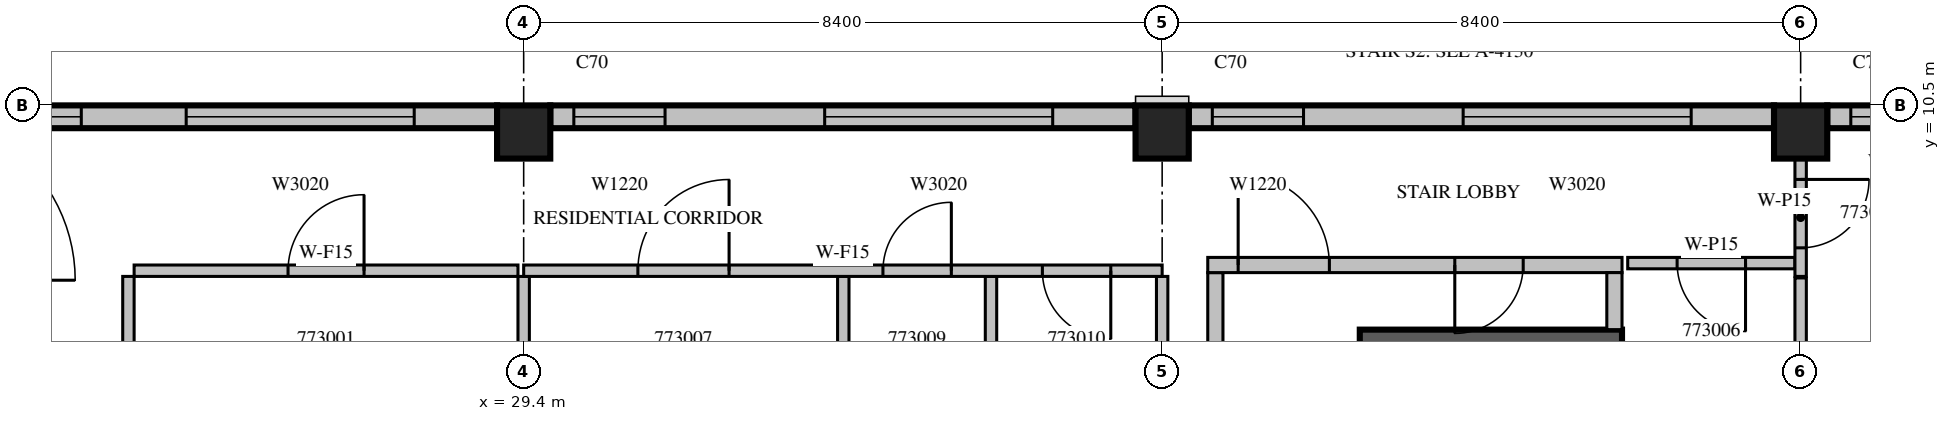
"""IFC4 building model, lengths in metres.
Left out: names, types, materials, properties, quantities, classifications, styles, units other than length and angle.
Written with IfcOpenShell. Run it as: python <this file> out.ifc"""

import sys

from ifc_helpers import new_model, si_unit, direction, frame, frame_2d, origin, origin_2d, place, context, subcontext, project, spatial, rectangle, extrude, source, transform, mapped, element, fill, save


model = new_model("IFC4")
c1 = context("Model", 3, precision=1e-05, world=origin(), true_north=direction((0.0, 1.0)))
c2 = subcontext(c1, "Body", "Model", "MODEL_VIEW")
j1 = project(units=[si_unit("LENGTHUNIT", "METRE"), si_unit("PLANEANGLEUNIT", "RADIAN")], contexts=[c1])
p1 = place(None, origin())
s1 = spatial("IfcSite", under=j1, at=p1, CompositionType="ELEMENT")
p2 = place(p1, origin())
s2 = spatial("IfcBuilding", under=s1, at=p2, CompositionType="ELEMENT")
p3 = place(p2, frame((0.0, 0.0, 316.0)))
s3 = spatial("IfcBuildingStorey", under=s2, at=p3, CompositionType="ELEMENT", Elevation=316.0)
m1 = source(origin(), c2, "Body", "SweptSolid", [
    extrude(rectangle(XDim=0.7, YDim=0.7, at=origin_2d()), origin(), (0.0, 0.0, 1.0), 3.5),
])
for number, where, z_axis, x_axis in (
    (1, (29.4, 10.15, 0.0), (0.0, 0.0, 1.0), (1.0, 0.0, 0.0)),
    (2, (37.8, 10.15, 0.0), (0.0, 0.0, 1.0), (1.0, 0.0, 0.0)),
    (3, (46.2, 10.15, 0.0), (0.0, 0.0, 1.0), (1.0, 0.0, 0.0)),
):
    element("IfcColumn", number, at=place(p3, frame(where, z_axis=z_axis, x_axis=x_axis)), inside=s3, PredefinedType="COLUMN", context=c2, shape_type="MappedRepresentation", body=[
        mapped(m1, transform((0.0, 0.0, 0.0), scale=1.0)),
    ])
m2 = source(origin(), c2, "Body", "SweptSolid", [
    extrude(rectangle(XDim=3.01, YDim=0.3, at=frame_2d((1.505, 0.0))), origin(), (0.0, 0.0, 1.0), 3.1),
])
p4 = place(p3, frame((49.56, 10.35, 0.0), z_axis=(0.0, 0.0, 1.0), x_axis=(-1.0, 0.0, 0.0)))
e4 = element("IfcWall", 4, at=p4, inside=s3, PredefinedType="STANDARD", context=c2, shape_type="MappedRepresentation", body=[
    mapped(m2, transform((0.0, 0.0, 0.0), scale=1.0)),
])
m3 = source(origin(), c2, "Body", "SweptSolid", [
    extrude(rectangle(XDim=1.2, YDim=2.0, at=frame_2d((0.6, 1.0))), frame((0.0, 0.16, 0.0), z_axis=(0.0, -1.0, 0.0), x_axis=(1.0, 0.0, 0.0)), (0.0, 0.0, 1.0), 0.32),
])
p5 = place(p4, frame((1.5, 0.0, 0.6)))
e5 = element("IfcOpeningElement", 5, at=p5, cuts=e4, PredefinedType="OPENING", context=c2, shape_type="MappedRepresentation", body=[
    mapped(m3, transform((0.0, 0.0, 0.0), scale=1.0)),
])
m4 = source(origin(), c2, "Body", "SweptSolid", [
    extrude(rectangle(XDim=7.7, YDim=0.3, at=frame_2d((3.85, 0.0))), origin(), (0.0, 0.0, 1.0), 3.1),
])
p6 = place(p3, frame((45.85, 10.35, 0.0), z_axis=(0.0, 0.0, 1.0), x_axis=(-1.0, 0.0, 0.0)))
e6 = element("IfcWall", 6, at=p6, inside=s3, PredefinedType="STANDARD", context=c2, shape_type="MappedRepresentation", body=[
    mapped(m4, transform((0.0, 0.0, 0.0), scale=1.0)),
])
m5 = source(origin(), c2, "Body", "SweptSolid", [
    extrude(rectangle(XDim=3.0, YDim=2.0, at=frame_2d((1.5, 1.0))), frame((0.0, 0.16, 0.0), z_axis=(0.0, -1.0, 0.0), x_axis=(1.0, 0.0, 0.0)), (0.0, 0.0, 1.0), 0.32),
])
p7 = place(p6, frame((1.09, 0.0, 0.6)))
e7 = element("IfcOpeningElement", 7, at=p7, cuts=e6, PredefinedType="OPENING", context=c2, shape_type="MappedRepresentation", body=[
    mapped(m5, transform((0.0, 0.0, 0.0), scale=1.0)),
])
p8 = place(p6, frame((6.19, 0.0, 0.6)))
e8 = element("IfcOpeningElement", 8, at=p8, cuts=e6, PredefinedType="OPENING", context=c2, shape_type="MappedRepresentation", body=[
    mapped(m3, transform((0.0, 0.0, 0.0), scale=1.0)),
])
p9 = place(p3, frame((37.45, 10.35, 0.0), z_axis=(0.0, 0.0, 1.0), x_axis=(-1.0, 0.0, 0.0)))
e9 = element("IfcWall", 9, at=p9, inside=s3, PredefinedType="STANDARD", context=c2, shape_type="MappedRepresentation", body=[
    mapped(m4, transform((0.0, 0.0, 0.0), scale=1.0)),
])
p10 = place(p9, frame((1.09, 0.0, 0.6)))
e10 = element("IfcOpeningElement", 10, at=p10, cuts=e9, PredefinedType="OPENING", context=c2, shape_type="MappedRepresentation", body=[
    mapped(m5, transform((0.0, 0.0, 0.0), scale=1.0)),
])
p11 = place(p9, frame((6.19, 0.0, 0.6)))
e11 = element("IfcOpeningElement", 11, at=p11, cuts=e9, PredefinedType="OPENING", context=c2, shape_type="MappedRepresentation", body=[
    mapped(m3, transform((0.0, 0.0, 0.0), scale=1.0)),
])
m6 = source(origin(), c2, "Body", "SweptSolid", [
    extrude(rectangle(XDim=7.45, YDim=0.3, at=frame_2d((3.725, 0.0))), origin(), (0.0, 0.0, 1.0), 3.1),
])
p12 = place(p3, frame((29.05, 10.35, 0.0), z_axis=(0.0, 0.0, 1.0), x_axis=(-1.0, 0.0, 0.0)))
e12 = element("IfcWall", 12, at=p12, inside=s3, PredefinedType="STANDARD", context=c2, shape_type="MappedRepresentation", body=[
    mapped(m6, transform((0.0, 0.0, 0.0), scale=1.0)),
])
p13 = place(p12, frame((1.09, 0.0, 0.6)))
e13 = element("IfcOpeningElement", 13, at=p13, cuts=e12, PredefinedType="OPENING", context=c2, shape_type="MappedRepresentation", body=[
    mapped(m5, transform((0.0, 0.0, 0.0), scale=1.0)),
])
m7 = source(origin(), c2, "Body", "SweptSolid", [
    extrude(rectangle(XDim=1.8, YDim=2.0, at=frame_2d((0.9, 1.0))), frame((0.0, 0.16, 0.0), z_axis=(0.0, -1.0, 0.0), x_axis=(1.0, 0.0, 0.0)), (0.0, 0.0, 1.0), 0.32),
])
p14 = place(p12, frame((5.47, 0.0, 0.6)))
e14 = element("IfcOpeningElement", 14, at=p14, cuts=e12, PredefinedType="OPENING", context=c2, shape_type="MappedRepresentation", body=[
    mapped(m7, transform((0.0, 0.0, 0.0), scale=1.0)),
])
m8 = source(origin(), c2, "Body", "SweptSolid", [
    extrude(rectangle(XDim=3.45, YDim=0.25, at=frame_2d((1.725, 0.0))), origin(), (0.0, 0.0, 1.0), 3.1),
])
p15 = place(p3, frame((40.4, 7.425, 0.0), z_axis=(0.0, 0.0, 1.0), x_axis=(1.0, 0.0, 0.0)))
e15 = element("IfcWall", 15, at=p15, inside=s3, PredefinedType="SOLIDWALL", context=c2, shape_type="MappedRepresentation", body=[
    mapped(m8, transform((0.0, 0.0, 0.0), scale=1.0)),
])
m9 = source(origin(), c2, "Body", "SweptSolid", [
    extrude(rectangle(XDim=8.0, YDim=0.2, at=frame_2d((4.0, 0.0))), origin(), (0.0, 0.0, 1.0), 3.1),
])
p16 = place(p3, frame((38.5, 0.3, 0.0), z_axis=(0.0, 0.0, 1.0), x_axis=(0.0, 1.0, 0.0)))
e16 = element("IfcWall", 16, at=p16, inside=s3, PredefinedType="PARTITIONING", context=c2, shape_type="MappedRepresentation", body=[
    mapped(m9, transform((0.0, 0.0, 0.0), scale=1.0)),
])
m10 = source(origin(), c2, "Body", "SweptSolid", [
    extrude(rectangle(XDim=5.45, YDim=0.2, at=frame_2d((2.725, 0.0))), origin(), (0.0, 0.0, 1.0), 3.1),
])
p17 = place(p3, frame((38.4, 8.4, 0.0), z_axis=(0.0, 0.0, 1.0), x_axis=(1.0, 0.0, 0.0)))
e17 = element("IfcWall", 17, at=p17, inside=s3, PredefinedType="PARTITIONING", context=c2, shape_type="MappedRepresentation", body=[
    mapped(m10, transform((0.0, 0.0, 0.0), scale=1.0)),
])
m11 = source(origin(), c2, "Body", "SweptSolid", [
    extrude(rectangle(XDim=1.2, YDim=2.1, at=frame_2d((0.6, 1.05))), frame((0.0, 0.11, 0.0), z_axis=(0.0, -1.0, 0.0), x_axis=(1.0, 0.0, 0.0)), (0.0, 0.0, 1.0), 0.22),
])
p18 = place(p17, frame((0.4, 0.0, 0.0)))
e18 = element("IfcOpeningElement", 18, at=p18, cuts=e17, PredefinedType="OPENING", context=c2, shape_type="MappedRepresentation", body=[
    mapped(m11, transform((0.0, 0.0, 0.0), scale=1.0)),
])
m12 = source(origin(), c2, "Body", "SweptSolid", [
    extrude(rectangle(XDim=0.9, YDim=2.1, at=frame_2d((0.45, 1.05))), frame((0.0, 0.11, 0.0), z_axis=(0.0, -1.0, 0.0), x_axis=(1.0, 0.0, 0.0)), (0.0, 0.0, 1.0), 0.22),
])
p19 = place(p17, frame((3.25, 0.0, 0.0)))
e19 = element("IfcOpeningElement", 19, at=p19, cuts=e17, PredefinedType="OPENING", context=c2, shape_type="MappedRepresentation", body=[
    mapped(m12, transform((0.0, 0.0, 0.0), scale=1.0)),
])
m13 = source(origin(), c2, "Body", "SweptSolid", [
    extrude(rectangle(XDim=0.75, YDim=0.2, at=frame_2d((0.375, 0.0))), origin(), (0.0, 0.0, 1.0), 3.1),
])
p20 = place(p3, frame((43.75, 7.55, 0.0), z_axis=(0.0, 0.0, 1.0), x_axis=(0.0, 1.0, 0.0)))
e20 = element("IfcWall", 20, at=p20, inside=s3, PredefinedType="PARTITIONING", context=c2, shape_type="MappedRepresentation", body=[
    mapped(m13, transform((0.0, 0.0, 0.0), scale=1.0)),
])
m14 = source(origin(), c2, "Body", "SweptSolid", [
    extrude(rectangle(XDim=4.575, YDim=0.15, at=frame_2d((2.288, 0.0))), origin(), (0.0, 0.0, 1.0), 3.1),
])
p21 = place(p3, frame((24.2, 8.25, 0.0), z_axis=(0.0, 0.0, 1.0), x_axis=(0.0, -1.0, 0.0)))
e21 = element("IfcWall", 21, at=p21, inside=s3, PredefinedType="PARTITIONING", context=c2, shape_type="MappedRepresentation", body=[
    mapped(m14, transform((0.0, 0.0, 0.0), scale=1.0)),
])
m15 = source(origin(), c2, "Body", "SweptSolid", [
    extrude(rectangle(XDim=0.9, YDim=2.1, at=frame_2d((0.45, 1.05))), frame((0.0, 0.085, 0.0), z_axis=(0.0, -1.0, 0.0), x_axis=(1.0, 0.0, 0.0)), (0.0, 0.0, 1.0), 0.17),
])
p22 = place(p21, frame((2.981, 0.0, 0.0)))
e22 = element("IfcOpeningElement", 22, at=p22, cuts=e21, PredefinedType="OPENING", context=c2, shape_type="MappedRepresentation", body=[
    mapped(m15, transform((0.0, 0.0, 0.0), scale=1.0)),
])
p23 = place(p3, frame((29.4, 3.675, 0.0), z_axis=(0.0, 0.0, 1.0), x_axis=(0.0, 1.0, 0.0)))
e23 = element("IfcWall", 23, at=p23, inside=s3, PredefinedType="PARTITIONING", context=c2, shape_type="MappedRepresentation", body=[
    mapped(m14, transform((0.0, 0.0, 0.0), scale=1.0)),
])
p24 = place(p3, frame((29.325, 8.325, 0.0), z_axis=(0.0, 0.0, 1.0), x_axis=(-1.0, 0.0, 0.0)))
e24 = element("IfcWall", 24, at=p24, inside=s3, PredefinedType="PARTITIONING", context=c2, shape_type="SweptSolid", body=[
    extrude(rectangle(XDim=5.05, YDim=0.15, at=frame_2d((2.525, 0.0))), origin(), (0.0, 0.0, 1.0), 3.1),
])
m16 = source(origin(), c2, "Body", "SweptSolid", [
    extrude(rectangle(XDim=1.0, YDim=2.1, at=frame_2d((0.5, 1.05))), frame((0.0, 0.085, 0.0), z_axis=(0.0, -1.0, 0.0), x_axis=(1.0, 0.0, 0.0)), (0.0, 0.0, 1.0), 0.17),
])
p25 = place(p24, frame((2.025, 0.0, 0.0)))
e25 = element("IfcOpeningElement", 25, at=p25, cuts=e24, PredefinedType="OPENING", context=c2, shape_type="MappedRepresentation", body=[
    mapped(m16, transform((0.0, 0.0, 0.0), scale=1.0)),
])
m17 = source(origin(), c2, "Body", "SweptSolid", [
    extrude(rectangle(XDim=2.2, YDim=0.15, at=frame_2d((1.1, 0.0))), origin(), (0.0, 0.0, 1.0), 3.1),
])
p26 = place(p3, frame((46.125, 8.425, 0.0), z_axis=(0.0, 0.0, 1.0), x_axis=(-1.0, 0.0, 0.0)))
e26 = element("IfcWall", 26, at=p26, inside=s3, PredefinedType="PARTITIONING", context=c2, shape_type="MappedRepresentation", body=[
    mapped(m17, transform((0.0, 0.0, 0.0), scale=1.0)),
])
p27 = place(p26, frame((0.65, 0.0, 0.0)))
e27 = element("IfcOpeningElement", 27, at=p27, cuts=e26, PredefinedType="OPENING", context=c2, shape_type="MappedRepresentation", body=[
    mapped(m15, transform((0.0, 0.0, 0.0), scale=1.0)),
])
p28 = place(p3, frame((33.605, 5.25, 0.0), z_axis=(0.0, 0.0, 1.0), x_axis=(0.0, 1.0, 0.0)))
e28 = element("IfcWall", 28, at=p28, inside=s3, PredefinedType="PARTITIONING", context=c2, shape_type="SweptSolid", body=[
    extrude(rectangle(XDim=3.0, YDim=0.15, at=frame_2d((1.5, 0.0))), origin(), (0.0, 0.0, 1.0), 3.1),
])
m18 = source(origin(), c2, "Body", "SweptSolid", [
    extrude(rectangle(XDim=3.0, YDim=0.15, at=frame_2d((1.5, 0.0))), origin(), (0.0, 0.0, 1.0), 3.1),
])
for number, where, z_axis, x_axis in (
    (29, (35.548, 5.25, 0.0), (0.0, 0.0, 1.0), (0.0, 1.0, 0.0)),
    (30, (37.8, 5.25, 0.0), (0.0, 0.0, 1.0), (0.0, 1.0, 0.0)),
):
    element("IfcWall", number, at=place(p3, frame(where, z_axis=z_axis, x_axis=x_axis)), inside=s3, PredefinedType="PARTITIONING", context=c2, shape_type="MappedRepresentation", body=[
        mapped(m18, transform((0.0, 0.0, 0.0), scale=1.0)),
    ])
m19 = source(origin(), c2, "Body", "SweptSolid", [
    extrude(rectangle(XDim=1.551, YDim=0.15, at=frame_2d((0.775, 0.0))), origin(), (0.0, 0.0, 1.0), 3.1),
])
p29 = place(p3, frame((46.2, 9.801, 0.0), z_axis=(0.0, 0.0, 1.0), x_axis=(0.0, -1.0, 0.0)))
e31 = element("IfcWall", 31, at=p29, inside=s3, PredefinedType="PARTITIONING", context=c2, shape_type="MappedRepresentation", body=[
    mapped(m19, transform((0.0, 0.0, 0.0), scale=1.0)),
])
p30 = place(p29, frame((0.275, 0.0, 0.0)))
e32 = element("IfcOpeningElement", 32, at=p30, cuts=e31, PredefinedType="OPENING", context=c2, shape_type="MappedRepresentation", body=[
    mapped(m15, transform((0.0, 0.0, 0.0), scale=1.0)),
])
p31 = place(p3, frame((46.2, 5.25, 0.0), z_axis=(0.0, 0.0, 1.0), x_axis=(0.0, 1.0, 0.0)))
e33 = element("IfcWall", 33, at=p31, inside=s3, PredefinedType="PARTITIONING", context=c2, shape_type="SweptSolid", body=[
    extrude(rectangle(XDim=2.98, YDim=0.15, at=frame_2d((1.49, 0.0))), origin(), (0.0, 0.0, 1.0), 3.1),
])
m20 = source(origin(), c2, "Body", "SweptSolid", [
    extrude(rectangle(XDim=8.4, YDim=0.15, at=frame_2d((4.2, 0.0))), origin(), (0.0, 0.0, 1.0), 3.1),
])
p32 = place(p3, frame((37.8, 8.325, 0.0), z_axis=(0.0, 0.0, 1.0), x_axis=(-1.0, 0.0, 0.0)))
e34 = element("IfcWall", 34, at=p32, inside=s3, PredefinedType="PARTITIONING", context=c2, shape_type="MappedRepresentation", body=[
    mapped(m20, transform((0.0, 0.0, 0.0), scale=1.0)),
])
m21 = source(origin(), c2, "Body", "SweptSolid", [
    extrude(rectangle(XDim=1.2, YDim=2.1, at=frame_2d((0.6, 1.05))), frame((0.0, 0.085, 0.0), z_axis=(0.0, -1.0, 0.0), x_axis=(1.0, 0.0, 0.0)), (0.0, 0.0, 1.0), 0.17),
])
p33 = place(p32, frame((5.698, 0.0, 0.0)))
e35 = element("IfcOpeningElement", 35, at=p33, cuts=e34, PredefinedType="OPENING", context=c2, shape_type="MappedRepresentation", body=[
    mapped(m21, transform((0.0, 0.0, 0.0), scale=1.0)),
])
p34 = place(p32, frame((2.773, 0.0, 0.0)))
e36 = element("IfcOpeningElement", 36, at=p34, cuts=e34, PredefinedType="OPENING", context=c2, shape_type="MappedRepresentation", body=[
    mapped(m15, transform((0.0, 0.0, 0.0), scale=1.0)),
])
p35 = place(p32, frame((0.676, 0.0, 0.0)))
e37 = element("IfcOpeningElement", 37, at=p35, cuts=e34, PredefinedType="OPENING", context=c2, shape_type="MappedRepresentation", body=[
    mapped(m15, transform((0.0, 0.0, 0.0), scale=1.0)),
])
m22 = source(origin(), c2, "Body", "SweptSolid", [
    extrude(rectangle(XDim=1.2, YDim=2.0, at=frame_2d((0.6, 1.0))), frame((0.0, 0.03, 0.0), z_axis=(0.0, -1.0, 0.0), x_axis=(1.0, 0.0, 0.0)), (0.0, 0.0, 1.0), 0.06),
])
p36 = place(p5, origin())
e38 = element("IfcWindow", 38, at=p36, inside=s3, PartitioningType="SINGLE_PANEL", PredefinedType="WINDOW", context=c2, shape_type="MappedRepresentation", body=[
    mapped(m22, transform((0.0, 0.0, 0.0), scale=1.0)),
])
fill(e5, e38)
m23 = source(origin(), c2, "Body", "SweptSolid", [
    extrude(rectangle(XDim=3.0, YDim=2.0, at=frame_2d((1.5, 1.0))), frame((0.0, 0.03, 0.0), z_axis=(0.0, -1.0, 0.0), x_axis=(1.0, 0.0, 0.0)), (0.0, 0.0, 1.0), 0.06),
])
p37 = place(p7, origin())
e39 = element("IfcWindow", 39, at=p37, inside=s3, PartitioningType="SINGLE_PANEL", PredefinedType="WINDOW", context=c2, shape_type="MappedRepresentation", body=[
    mapped(m23, transform((0.0, 0.0, 0.0), scale=1.0)),
])
fill(e7, e39)
p38 = place(p8, origin())
e40 = element("IfcWindow", 40, at=p38, inside=s3, PartitioningType="SINGLE_PANEL", PredefinedType="WINDOW", context=c2, shape_type="MappedRepresentation", body=[
    mapped(m22, transform((0.0, 0.0, 0.0), scale=1.0)),
])
fill(e8, e40)
p39 = place(p10, origin())
e41 = element("IfcWindow", 41, at=p39, inside=s3, PartitioningType="SINGLE_PANEL", PredefinedType="WINDOW", context=c2, shape_type="MappedRepresentation", body=[
    mapped(m23, transform((0.0, 0.0, 0.0), scale=1.0)),
])
fill(e10, e41)
p40 = place(p11, origin())
e42 = element("IfcWindow", 42, at=p40, inside=s3, PartitioningType="SINGLE_PANEL", PredefinedType="WINDOW", context=c2, shape_type="MappedRepresentation", body=[
    mapped(m22, transform((0.0, 0.0, 0.0), scale=1.0)),
])
fill(e11, e42)
p41 = place(p13, origin())
e43 = element("IfcWindow", 43, at=p41, inside=s3, PartitioningType="SINGLE_PANEL", PredefinedType="WINDOW", context=c2, shape_type="MappedRepresentation", body=[
    mapped(m23, transform((0.0, 0.0, 0.0), scale=1.0)),
])
fill(e13, e43)
m24 = source(origin(), c2, "Body", "SweptSolid", [
    extrude(rectangle(XDim=1.8, YDim=2.0, at=frame_2d((0.9, 1.0))), frame((0.0, 0.03, 0.0), z_axis=(0.0, -1.0, 0.0), x_axis=(1.0, 0.0, 0.0)), (0.0, 0.0, 1.0), 0.06),
])
p42 = place(p14, origin())
e44 = element("IfcWindow", 44, at=p42, inside=s3, PartitioningType="SINGLE_PANEL", PredefinedType="WINDOW", context=c2, shape_type="MappedRepresentation", body=[
    mapped(m24, transform((0.0, 0.0, 0.0), scale=1.0)),
])
fill(e14, e44)
m25 = source(origin(), c2, "Body", "SweptSolid", [
    extrude(rectangle(XDim=1.2, YDim=2.1, at=frame_2d((0.6, 1.05))), frame((0.0, 0.025, 0.0), z_axis=(0.0, -1.0, 0.0), x_axis=(1.0, 0.0, 0.0)), (0.0, 0.0, 1.0), 0.05),
])
p43 = place(p18, origin())
e45 = element("IfcDoor", 45, at=p43, inside=s3, OperationType="SINGLE_SWING_LEFT", PredefinedType="DOOR", context=c2, shape_type="MappedRepresentation", body=[
    mapped(m25, transform((0.0, 0.0, 0.0), scale=1.0)),
])
fill(e18, e45)
m26 = source(origin(), c2, "Body", "SweptSolid", [
    extrude(rectangle(XDim=0.9, YDim=2.1, at=frame_2d((0.45, 1.05))), frame((0.0, 0.025, 0.0), z_axis=(0.0, -1.0, 0.0), x_axis=(1.0, 0.0, 0.0)), (0.0, 0.0, 1.0), 0.05),
])
p44 = place(p19, origin())
e46 = element("IfcDoor", 46, at=p44, inside=s3, OperationType="SINGLE_SWING_RIGHT", PredefinedType="DOOR", context=c2, shape_type="MappedRepresentation", body=[
    mapped(m26, transform((0.0, 0.0, 0.0), scale=1.0)),
])
fill(e19, e46)
m27 = source(origin(), c2, "Body", "SweptSolid", [
    extrude(rectangle(XDim=1.0, YDim=2.1, at=frame_2d((0.5, 1.05))), frame((0.0, 0.025, 0.0), z_axis=(0.0, -1.0, 0.0), x_axis=(1.0, 0.0, 0.0)), (0.0, 0.0, 1.0), 0.05),
])
p45 = place(p25, origin())
e47 = element("IfcDoor", 47, at=p45, inside=s3, OperationType="SINGLE_SWING_RIGHT", PredefinedType="DOOR", context=c2, shape_type="MappedRepresentation", body=[
    mapped(m27, transform((0.0, 0.0, 0.0), scale=1.0)),
])
fill(e25, e47)
p46 = place(p27, origin())
e48 = element("IfcDoor", 48, at=p46, inside=s3, OperationType="SINGLE_SWING_LEFT", PredefinedType="DOOR", context=c2, shape_type="MappedRepresentation", body=[
    mapped(m26, transform((0.0, 0.0, 0.0), scale=1.0)),
])
fill(e27, e48)
p47 = place(p33, origin())
e49 = element("IfcDoor", 49, at=p47, inside=s3, OperationType="SINGLE_SWING_RIGHT", PredefinedType="DOOR", context=c2, shape_type="MappedRepresentation", body=[
    mapped(m25, transform((0.0, 0.0, 0.0), scale=1.0)),
])
fill(e35, e49)
p48 = place(p34, origin())
e50 = element("IfcDoor", 50, at=p48, inside=s3, OperationType="SINGLE_SWING_RIGHT", PredefinedType="DOOR", context=c2, shape_type="MappedRepresentation", body=[
    mapped(m26, transform((0.0, 0.0, 0.0), scale=1.0)),
])
fill(e36, e50)
p49 = place(p35, origin())
e51 = element("IfcDoor", 51, at=p49, inside=s3, OperationType="SINGLE_SWING_LEFT", PredefinedType="DOOR", context=c2, shape_type="MappedRepresentation", body=[
    mapped(m26, transform((0.0, 0.0, 0.0), scale=1.0)),
])
fill(e37, e51)
p50 = place(p30, origin())
e52 = element("IfcDoor", 52, at=p50, inside=s3, OperationType="SINGLE_SWING_LEFT", PredefinedType="DOOR", context=c2, shape_type="MappedRepresentation", body=[
    mapped(m26, transform((0.0, 0.0, 0.0), scale=1.0)),
])
fill(e32, e52)
save(model, sys.argv[1])
